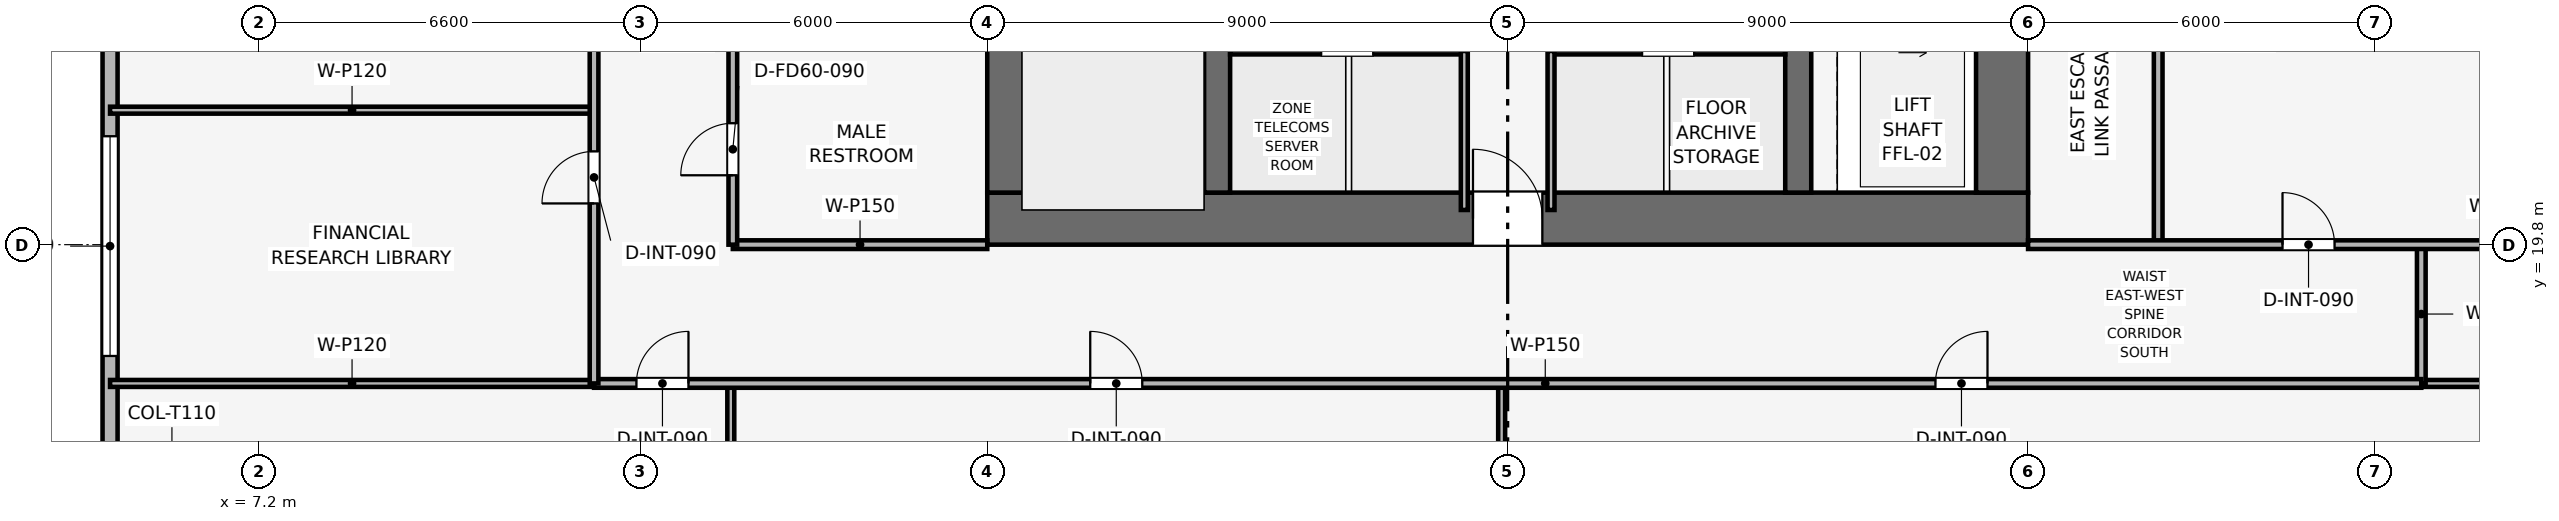
"""IFC4 building model, lengths in metres.
Left out: names, types, materials, properties, quantities, classifications, styles, units other than length and angle.
Written with IfcOpenShell. Run it as: python <this file> out.ifc"""

import sys

from ifc_helpers import new_model, si_unit, direction, frame, frame_2d, origin, place, context, subcontext, project, spatial, rectangle, extrude, element, fill, save


model = new_model("IFC4")
c1 = context("Model", 3, precision=1e-05, world=origin(), true_north=direction((0.0, 1.0)))
c2 = subcontext(c1, "Body", "Model", "MODEL_VIEW")
j1 = project(units=[si_unit("LENGTHUNIT", "METRE"), si_unit("PLANEANGLEUNIT", "RADIAN")], contexts=[c1])
p1 = place(None, origin())
s1 = spatial("IfcSite", under=j1, at=p1, CompositionType="ELEMENT")
p2 = place(p1, origin())
s2 = spatial("IfcBuilding", under=s1, at=p2, CompositionType="ELEMENT")
p3 = place(p2, frame((0.0, 0.0, 160.8)))
s3 = spatial("IfcBuildingStorey", under=s2, at=p3, CompositionType="ELEMENT", Elevation=160.8)
p4 = place(p3, frame((19.8, 20.25, 0.0), z_axis=(0.0, 0.0, 1.0), x_axis=(1.0, 0.0, 0.0)))
e1 = element("IfcWall", 1, at=p4, inside=s3, PredefinedType="SHEAR", context=c2, shape_type="SweptSolid", body=[
    extrude(rectangle(XDim=18.0, YDim=0.9, at=frame_2d((9.0, 0.0))), origin(), (0.0, 0.0, 1.0), 3.75),
])
p5 = place(p4, frame((8.4, 0.0, 0.0)))
e2 = element("IfcOpeningElement", 2, at=p5, cuts=e1, PredefinedType="OPENING", context=c2, shape_type="SweptSolid", body=[
    extrude(rectangle(XDim=1.2, YDim=2.2, at=frame_2d((0.6, 1.1))), frame((0.0, 0.46, 0.0), z_axis=(0.0, -1.0, 0.0), x_axis=(1.0, 0.0, 0.0)), (0.0, 0.0, 1.0), 0.92),
])
p6 = place(p3, frame((20.25, 20.7, 0.0), z_axis=(0.0, 0.0, 1.0), x_axis=(0.0, 1.0, 0.0)))
e3 = element("IfcWall", 3, at=p6, inside=s3, PredefinedType="SHEAR", context=c2, shape_type="SweptSolid", body=[
    extrude(rectangle(XDim=16.2, YDim=0.9, at=frame_2d((8.1, 0.0))), origin(), (0.0, 0.0, 1.0), 3.75),
])
p7 = place(p6, frame((10.1, 0.0, 0.0)))
e4 = element("IfcOpeningElement", 4, at=p7, cuts=e3, PredefinedType="OPENING", context=c2, shape_type="SweptSolid", body=[
    extrude(rectangle(XDim=1.1, YDim=2.15, at=frame_2d((0.55, 1.075))), frame((0.0, 0.46, 0.0), z_axis=(0.0, -1.0, 0.0), x_axis=(1.0, 0.0, 0.0)), (0.0, 0.0, 1.0), 0.92),
])
p8 = place(p3, frame((37.35, 20.7, 0.0), z_axis=(0.0, 0.0, 1.0), x_axis=(0.0, 1.0, 0.0)))
e5 = element("IfcWall", 5, at=p8, inside=s3, PredefinedType="SHEAR", context=c2, shape_type="SweptSolid", body=[
    extrude(rectangle(XDim=16.2, YDim=0.9, at=frame_2d((8.1, 0.0))), origin(), (0.0, 0.0, 1.0), 3.75),
])
p9 = place(p8, frame((4.6, 0.0, 0.0)))
e6 = element("IfcOpeningElement", 6, at=p9, cuts=e5, PredefinedType="OPENING", context=c2, shape_type="SweptSolid", body=[
    extrude(rectangle(XDim=1.1, YDim=2.15, at=frame_2d((0.55, 1.075))), frame((0.0, 0.46, 0.0), z_axis=(0.0, -1.0, 0.0), x_axis=(1.0, 0.0, 0.0)), (0.0, 0.0, 1.0), 0.92),
])
for number, where, z_axis, x_axis in (
    (7, (23.775, 20.7, 0.0), (0.0, 0.0, 1.0), (0.0, 1.0, 0.0)),
    (8, (33.825, 20.7, 0.0), (0.0, 0.0, 1.0), (0.0, 1.0, 0.0)),
):
    element("IfcWall", number, at=place(p3, frame(where, z_axis=z_axis, x_axis=x_axis)), inside=s3, PredefinedType="SHEAR", context=c2, shape_type="SweptSolid", body=[
        extrude(rectangle(XDim=16.2, YDim=0.45, at=frame_2d((8.1, 0.0))), origin(), (0.0, 0.0, 1.0), 3.75),
    ])
p10 = place(p3, frame((4.63, 11.4, 0.0), z_axis=(0.0, 0.0, 1.0), x_axis=(0.0, 1.0, 0.0)))
e9 = element("IfcWall", 9, at=p10, inside=s3, PredefinedType="SOLIDWALL", context=c2, shape_type="SweptSolid", body=[
    extrude(rectangle(XDim=12.6, YDim=0.26, at=frame_2d((6.3, 0.0))), origin(), (0.0, 0.0, 1.0), 3.495),
])
p11 = place(p10, frame((6.475, 0.0, 0.9)))
e10 = element("IfcOpeningElement", 10, at=p11, cuts=e9, PredefinedType="OPENING", context=c2, shape_type="SweptSolid", body=[
    extrude(rectangle(XDim=3.8, YDim=1.9, at=frame_2d((1.9, 0.95))), frame((0.0, 0.14, 0.0), z_axis=(0.0, -1.0, 0.0), x_axis=(1.0, 0.0, 0.0)), (0.0, 0.0, 1.0), 0.28),
])
p12 = place(p3, frame((24.0, 23.15, 0.0), z_axis=(0.0, 0.0, 1.0), x_axis=(1.0, 0.0, 0.0)))
e11 = element("IfcWall", 11, at=p12, inside=s3, PredefinedType="PARTITIONING", context=c2, shape_type="SweptSolid", body=[
    extrude(rectangle(XDim=4.05, YDim=0.12, at=frame_2d((2.025, 0.0))), origin(), (0.0, 0.0, 1.0), 3.495),
])
p13 = place(p12, frame((1.575, 0.0, 0.0)))
e12 = element("IfcOpeningElement", 12, at=p13, cuts=e11, PredefinedType="OPENING", context=c2, shape_type="SweptSolid", body=[
    extrude(rectangle(XDim=0.9, YDim=2.1, at=frame_2d((0.45, 1.05))), frame((0.0, 0.07, 0.0), z_axis=(0.0, -1.0, 0.0), x_axis=(1.0, 0.0, 0.0)), (0.0, 0.0, 1.0), 0.14),
])
p14 = place(p3, frame((28.05, 20.4, 0.0), z_axis=(0.0, 0.0, 1.0), x_axis=(0.0, 1.0, 0.0)))
e13 = element("IfcWall", 13, at=p14, inside=s3, PredefinedType="PARTITIONING", context=c2, shape_type="SweptSolid", body=[
    extrude(rectangle(XDim=2.75, YDim=0.12, at=frame_2d((1.375, 0.0))), origin(), (0.0, 0.0, 1.0), 3.495),
])
p15 = place(p3, frame((29.55, 23.15, 0.0), z_axis=(0.0, 0.0, 1.0), x_axis=(1.0, 0.0, 0.0)))
e14 = element("IfcWall", 14, at=p15, inside=s3, PredefinedType="PARTITIONING", context=c2, shape_type="SweptSolid", body=[
    extrude(rectangle(XDim=4.05, YDim=0.12, at=frame_2d((2.025, 0.0))), origin(), (0.0, 0.0, 1.0), 3.495),
])
p16 = place(p15, frame((1.575, 0.0, 0.0)))
e15 = element("IfcOpeningElement", 15, at=p16, cuts=e14, PredefinedType="OPENING", context=c2, shape_type="SweptSolid", body=[
    extrude(rectangle(XDim=0.9, YDim=2.1, at=frame_2d((0.45, 1.05))), frame((0.0, 0.07, 0.0), z_axis=(0.0, -1.0, 0.0), x_axis=(1.0, 0.0, 0.0)), (0.0, 0.0, 1.0), 0.14),
])
p17 = place(p3, frame((29.55, 20.4, 0.0), z_axis=(0.0, 0.0, 1.0), x_axis=(0.0, 1.0, 0.0)))
e16 = element("IfcWall", 16, at=p17, inside=s3, PredefinedType="PARTITIONING", context=c2, shape_type="SweptSolid", body=[
    extrude(rectangle(XDim=2.75, YDim=0.12, at=frame_2d((1.375, 0.0))), origin(), (0.0, 0.0, 1.0), 3.495),
])
p18 = place(p3, frame((15.4, 19.8, 0.0), z_axis=(0.0, 0.0, 1.0), x_axis=(1.0, 0.0, 0.0)))
e17 = element("IfcWall", 17, at=p18, inside=s3, PredefinedType="PARTITIONING", context=c2, shape_type="SweptSolid", body=[
    extrude(rectangle(XDim=4.4, YDim=0.15, at=frame_2d((2.2, 0.0))), origin(), (0.0, 0.0, 1.0), 3.03),
])
p19 = place(p3, frame((15.4, 19.8, 0.0), z_axis=(0.0, 0.0, 1.0), x_axis=(0.0, 1.0, 0.0)))
e18 = element("IfcWall", 18, at=p19, inside=s3, PredefinedType="PARTITIONING", context=c2, shape_type="SweptSolid", body=[
    extrude(rectangle(XDim=10.35, YDim=0.15, at=frame_2d((5.175, 0.0))), origin(), (0.0, 0.0, 1.0), 3.03),
])
p20 = place(p19, frame((1.2, 0.0, 0.0)))
e19 = element("IfcOpeningElement", 19, at=p20, cuts=e18, PredefinedType="OPENING", context=c2, shape_type="SweptSolid", body=[
    extrude(rectangle(XDim=0.9, YDim=2.1, at=frame_2d((0.45, 1.05))), frame((0.0, 0.085, 0.0), z_axis=(0.0, -1.0, 0.0), x_axis=(1.0, 0.0, 0.0)), (0.0, 0.0, 1.0), 0.17),
])
p21 = place(p19, frame((4.7, 0.0, 0.0)))
e20 = element("IfcOpeningElement", 20, at=p21, cuts=e18, PredefinedType="OPENING", context=c2, shape_type="SweptSolid", body=[
    extrude(rectangle(XDim=0.9, YDim=2.1, at=frame_2d((0.45, 1.05))), frame((0.0, 0.085, 0.0), z_axis=(0.0, -1.0, 0.0), x_axis=(1.0, 0.0, 0.0)), (0.0, 0.0, 1.0), 0.17),
])
p22 = place(p19, frame((8.1, 0.0, 0.0)))
e21 = element("IfcOpeningElement", 21, at=p22, cuts=e18, PredefinedType="OPENING", context=c2, shape_type="SweptSolid", body=[
    extrude(rectangle(XDim=0.95, YDim=2.1, at=frame_2d((0.475, 1.05))), frame((0.0, 0.085, 0.0), z_axis=(0.0, -1.0, 0.0), x_axis=(1.0, 0.0, 0.0)), (0.0, 0.0, 1.0), 0.17),
])
p23 = place(p3, frame((40.05, 19.8, 0.0), z_axis=(0.0, 0.0, 1.0), x_axis=(0.0, 1.0, 0.0)))
e22 = element("IfcWall", 22, at=p23, inside=s3, PredefinedType="PARTITIONING", context=c2, shape_type="SweptSolid", body=[
    extrude(rectangle(XDim=7.05, YDim=0.15, at=frame_2d((3.525, 0.0))), origin(), (0.0, 0.0, 1.0), 3.03),
])
for number, where, z_axis, x_axis in (
    (23, (15.365, 4.63, 0.0), (0.0, 0.0, 1.0), (0.0, 1.0, 0.0)),
    (24, (28.696, 4.63, 0.0), (0.0, 0.0, 1.0), (0.0, 1.0, 0.0)),
):
    element("IfcWall", number, at=place(p3, frame(where, z_axis=z_axis, x_axis=x_axis)), inside=s3, PredefinedType="PARTITIONING", context=c2, shape_type="SweptSolid", body=[
        extrude(rectangle(XDim=12.77, YDim=0.12, at=frame_2d((6.385, 0.0))), origin(), (0.0, 0.0, 1.0), 2.98),
    ])
for number, where, z_axis, x_axis in (
    (25, (4.63, 22.126, 0.0), (0.0, 0.0, 1.0), (1.0, 0.0, 0.0)),
    (26, (4.63, 17.4, 0.0), (0.0, 0.0, 1.0), (1.0, 0.0, 0.0)),
):
    element("IfcWall", number, at=place(p3, frame(where, z_axis=z_axis, x_axis=x_axis)), inside=s3, PredefinedType="PARTITIONING", context=c2, shape_type="SweptSolid", body=[
        extrude(rectangle(XDim=8.37, YDim=0.12, at=frame_2d((4.185, 0.0))), origin(), (0.0, 0.0, 1.0), 2.98),
    ])
p24 = place(p3, frame((44.6, 17.4, 0.0), z_axis=(0.0, 0.0, 1.0), x_axis=(1.0, 0.0, 0.0)))
e27 = element("IfcWall", 27, at=p24, inside=s3, PredefinedType="PARTITIONING", context=c2, shape_type="SweptSolid", body=[
    extrude(rectangle(XDim=8.37, YDim=0.12, at=frame_2d((4.185, 0.0))), origin(), (0.0, 0.0, 1.0), 2.98),
])
p25 = place(p3, frame((44.6, 17.4, 0.0), z_axis=(0.0, 0.0, 1.0), x_axis=(0.0, 1.0, 0.0)))
e28 = element("IfcWall", 28, at=p25, inside=s3, PredefinedType="PARTITIONING", context=c2, shape_type="SweptSolid", body=[
    extrude(rectangle(XDim=2.4, YDim=0.15, at=frame_2d((1.2, 0.0))), origin(), (0.0, 0.0, 1.0), 3.495),
])
p26 = place(p3, frame((37.8, 19.8, 0.0), z_axis=(0.0, 0.0, 1.0), x_axis=(1.0, 0.0, 0.0)))
e29 = element("IfcWall", 29, at=p26, inside=s3, PredefinedType="PARTITIONING", context=c2, shape_type="SweptSolid", body=[
    extrude(rectangle(XDim=15.17, YDim=0.15, at=frame_2d((7.585, 0.0))), origin(), (0.0, 0.0, 1.0), 2.98),
])
p27 = place(p26, frame((4.4, 0.0, 0.0)))
e30 = element("IfcOpeningElement", 30, at=p27, cuts=e29, PredefinedType="OPENING", context=c2, shape_type="SweptSolid", body=[
    extrude(rectangle(XDim=0.9, YDim=2.1, at=frame_2d((0.45, 1.05))), frame((0.0, 0.085, 0.0), z_axis=(0.0, -1.0, 0.0), x_axis=(1.0, 0.0, 0.0)), (0.0, 0.0, 1.0), 0.17),
])
p28 = place(p3, frame((13.0, 17.4, 0.0), z_axis=(0.0, 0.0, 1.0), x_axis=(1.0, 0.0, 0.0)))
e31 = element("IfcWall", 31, at=p28, inside=s3, PredefinedType="PARTITIONING", context=c2, shape_type="SweptSolid", body=[
    extrude(rectangle(XDim=31.6, YDim=0.15, at=frame_2d((15.8, 0.0))), origin(), (0.0, 0.0, 1.0), 3.03),
])
p29 = place(p28, frame((0.733, 0.0, 0.0)))
e32 = element("IfcOpeningElement", 32, at=p29, cuts=e31, PredefinedType="OPENING", context=c2, shape_type="SweptSolid", body=[
    extrude(rectangle(XDim=0.9, YDim=2.1, at=frame_2d((0.45, 1.05))), frame((0.0, 0.085, 0.0), z_axis=(0.0, -1.0, 0.0), x_axis=(1.0, 0.0, 0.0)), (0.0, 0.0, 1.0), 0.17),
])
p30 = place(p28, frame((8.581, 0.0, 0.0)))
e33 = element("IfcOpeningElement", 33, at=p30, cuts=e31, PredefinedType="OPENING", context=c2, shape_type="SweptSolid", body=[
    extrude(rectangle(XDim=0.9, YDim=2.1, at=frame_2d((0.45, 1.05))), frame((0.0, 0.085, 0.0), z_axis=(0.0, -1.0, 0.0), x_axis=(1.0, 0.0, 0.0)), (0.0, 0.0, 1.0), 0.17),
])
p31 = place(p28, frame((23.198, 0.0, 0.0)))
e34 = element("IfcOpeningElement", 34, at=p31, cuts=e31, PredefinedType="OPENING", context=c2, shape_type="SweptSolid", body=[
    extrude(rectangle(XDim=0.9, YDim=2.1, at=frame_2d((0.45, 1.05))), frame((0.0, 0.085, 0.0), z_axis=(0.0, -1.0, 0.0), x_axis=(1.0, 0.0, 0.0)), (0.0, 0.0, 1.0), 0.17),
])
p32 = place(p3, frame((13.0, 17.4, 0.0), z_axis=(0.0, 0.0, 1.0), x_axis=(0.0, 1.0, 0.0)))
e35 = element("IfcWall", 35, at=p32, inside=s3, PredefinedType="PARTITIONING", context=c2, shape_type="SweptSolid", body=[
    extrude(rectangle(XDim=22.8, YDim=0.15, at=frame_2d((11.4, 0.0))), origin(), (0.0, 0.0, 1.0), 3.03),
])
p33 = place(p32, frame((3.113, 0.0, 0.0)))
e36 = element("IfcOpeningElement", 36, at=p33, cuts=e35, PredefinedType="OPENING", context=c2, shape_type="SweptSolid", body=[
    extrude(rectangle(XDim=0.9, YDim=2.1, at=frame_2d((0.45, 1.05))), frame((0.0, 0.085, 0.0), z_axis=(0.0, -1.0, 0.0), x_axis=(1.0, 0.0, 0.0)), (0.0, 0.0, 1.0), 0.17),
])
p34 = place(p32, frame((7.542, 0.0, 0.0)))
e37 = element("IfcOpeningElement", 37, at=p34, cuts=e35, PredefinedType="OPENING", context=c2, shape_type="SweptSolid", body=[
    extrude(rectangle(XDim=0.9, YDim=2.1, at=frame_2d((0.45, 1.05))), frame((0.0, 0.085, 0.0), z_axis=(0.0, -1.0, 0.0), x_axis=(1.0, 0.0, 0.0)), (0.0, 0.0, 1.0), 0.17),
])
p35 = place(p32, frame((15.378, 0.0, 0.0)))
e38 = element("IfcOpeningElement", 38, at=p35, cuts=e35, PredefinedType="OPENING", context=c2, shape_type="SweptSolid", body=[
    extrude(rectangle(XDim=0.9, YDim=2.1, at=frame_2d((0.45, 1.05))), frame((0.0, 0.085, 0.0), z_axis=(0.0, -1.0, 0.0), x_axis=(1.0, 0.0, 0.0)), (0.0, 0.0, 1.0), 0.17),
])
p36 = place(p11, origin())
e39 = element("IfcWindow", 39, at=p36, inside=s3, PartitioningType="SINGLE_PANEL", PredefinedType="WINDOW", context=c2, shape_type="SweptSolid", body=[
    extrude(rectangle(XDim=3.8, YDim=1.9, at=frame_2d((1.9, 0.95))), frame((0.0, 0.03, 0.0), z_axis=(0.0, -1.0, 0.0), x_axis=(1.0, 0.0, 0.0)), (0.0, 0.0, 1.0), 0.06),
])
fill(e10, e39)
p37 = place(p13, origin())
e40 = element("IfcDoor", 40, at=p37, inside=s3, OperationType="SINGLE_SWING_LEFT", PredefinedType="DOOR", context=c2, shape_type="SweptSolid", body=[
    extrude(rectangle(XDim=0.9, YDim=2.1, at=frame_2d((0.45, 1.05))), frame((0.0, 0.025, 0.0), z_axis=(0.0, -1.0, 0.0), x_axis=(1.0, 0.0, 0.0)), (0.0, 0.0, 1.0), 0.05),
])
fill(e12, e40)
p38 = place(p16, origin())
e41 = element("IfcDoor", 41, at=p38, inside=s3, OperationType="SINGLE_SWING_RIGHT", PredefinedType="DOOR", context=c2, shape_type="SweptSolid", body=[
    extrude(rectangle(XDim=0.9, YDim=2.1, at=frame_2d((0.45, 1.05))), frame((0.0, 0.025, 0.0), z_axis=(0.0, -1.0, 0.0), x_axis=(1.0, 0.0, 0.0)), (0.0, 0.0, 1.0), 0.05),
])
fill(e15, e41)
p39 = place(p20, origin())
e42 = element("IfcDoor", 42, at=p39, inside=s3, OperationType="SINGLE_SWING_LEFT", PredefinedType="DOOR", context=c2, shape_type="SweptSolid", body=[
    extrude(rectangle(XDim=0.9, YDim=2.1, at=frame_2d((0.45, 1.05))), frame((0.0, 0.025, 0.0), z_axis=(0.0, -1.0, 0.0), x_axis=(1.0, 0.0, 0.0)), (0.0, 0.0, 1.0), 0.05),
])
fill(e19, e42)
p40 = place(p27, origin())
e43 = element("IfcDoor", 43, at=p40, inside=s3, OperationType="SINGLE_SWING_LEFT", PredefinedType="DOOR", context=c2, shape_type="SweptSolid", body=[
    extrude(rectangle(XDim=0.9, YDim=2.1, at=frame_2d((0.45, 1.05))), frame((0.0, 0.025, 0.0), z_axis=(0.0, -1.0, 0.0), x_axis=(1.0, 0.0, 0.0)), (0.0, 0.0, 1.0), 0.05),
])
fill(e30, e43)
p41 = place(p29, origin())
e44 = element("IfcDoor", 44, at=p41, inside=s3, OperationType="SINGLE_SWING_RIGHT", PredefinedType="DOOR", context=c2, shape_type="SweptSolid", body=[
    extrude(rectangle(XDim=0.9, YDim=2.1, at=frame_2d((0.45, 1.05))), frame((0.0, 0.025, 0.0), z_axis=(0.0, -1.0, 0.0), x_axis=(1.0, 0.0, 0.0)), (0.0, 0.0, 1.0), 0.05),
])
fill(e32, e44)
p42 = place(p30, origin())
e45 = element("IfcDoor", 45, at=p42, inside=s3, OperationType="SINGLE_SWING_LEFT", PredefinedType="DOOR", context=c2, shape_type="SweptSolid", body=[
    extrude(rectangle(XDim=0.9, YDim=2.1, at=frame_2d((0.45, 1.05))), frame((0.0, 0.025, 0.0), z_axis=(0.0, -1.0, 0.0), x_axis=(1.0, 0.0, 0.0)), (0.0, 0.0, 1.0), 0.05),
])
fill(e33, e45)
p43 = place(p31, origin())
e46 = element("IfcDoor", 46, at=p43, inside=s3, OperationType="SINGLE_SWING_RIGHT", PredefinedType="DOOR", context=c2, shape_type="SweptSolid", body=[
    extrude(rectangle(XDim=0.9, YDim=2.1, at=frame_2d((0.45, 1.05))), frame((0.0, 0.025, 0.0), z_axis=(0.0, -1.0, 0.0), x_axis=(1.0, 0.0, 0.0)), (0.0, 0.0, 1.0), 0.05),
])
fill(e34, e46)
p44 = place(p33, origin())
e47 = element("IfcDoor", 47, at=p44, inside=s3, OperationType="SINGLE_SWING_LEFT", PredefinedType="DOOR", context=c2, shape_type="SweptSolid", body=[
    extrude(rectangle(XDim=0.9, YDim=2.1, at=frame_2d((0.45, 1.05))), frame((0.0, 0.025, 0.0), z_axis=(0.0, -1.0, 0.0), x_axis=(1.0, 0.0, 0.0)), (0.0, 0.0, 1.0), 0.05),
])
fill(e36, e47)
p45 = place(p5, origin())
e48 = element("IfcDoor", 48, at=p45, inside=s3, OperationType="SINGLE_SWING_LEFT", PredefinedType="DOOR", context=c2, shape_type="SweptSolid", body=[
    extrude(rectangle(XDim=1.2, YDim=2.2, at=frame_2d((0.6, 1.1))), frame((0.0, 0.025, 0.0), z_axis=(0.0, -1.0, 0.0), x_axis=(1.0, 0.0, 0.0)), (0.0, 0.0, 1.0), 0.05),
])
fill(e2, e48)
save(model, sys.argv[1])
